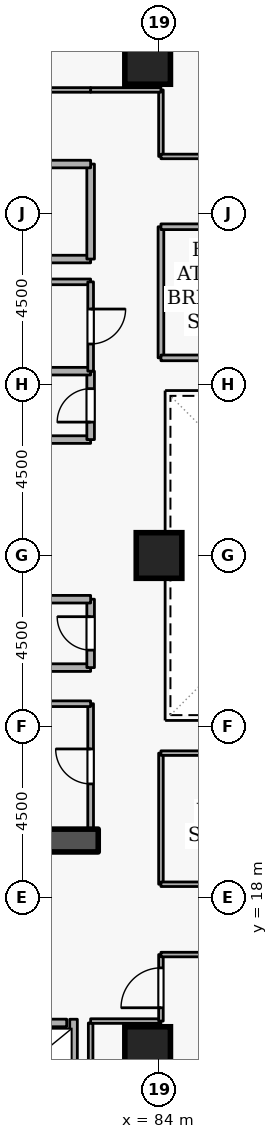
"""IFC4 building model, lengths in metres.
Left out: names, types, materials, properties, quantities, classifications, styles, units other than length and angle.
Written with IfcOpenShell. Run it as: python <this file> out.ifc"""

import sys

from ifc_helpers import new_model, si_unit, direction, frame, frame_2d, origin, origin_2d, place, context, subcontext, project, spatial, rectangle, extrude, element, fill, save


model = new_model("IFC4")
c1 = context("Model", 3, precision=1e-05, world=origin(), true_north=direction((0.0, 1.0)))
c2 = subcontext(c1, "Body", "Model", "MODEL_VIEW")
j1 = project(units=[si_unit("LENGTHUNIT", "METRE"), si_unit("PLANEANGLEUNIT", "RADIAN")], contexts=[c1])
p1 = place(None, origin())
s1 = spatial("IfcSite", under=j1, at=p1, CompositionType="ELEMENT")
p2 = place(p1, origin())
s2 = spatial("IfcBuilding", under=s1, at=p2, CompositionType="ELEMENT")
p3 = place(p2, frame((0.0, 0.0, 116.1)))
s3 = spatial("IfcBuildingStorey", under=s2, at=p3, CompositionType="ELEMENT", Elevation=116.1)
p4 = place(p3, frame((76.7, 19.5, 0.0), z_axis=(0.0, 0.0, 1.0), x_axis=(1.0, 0.0, 0.0)))
e1 = element("IfcWall", 1, at=p4, inside=s3, PredefinedType="SHEAR", context=c2, shape_type="SweptSolid", body=[
    extrude(rectangle(XDim=5.7, YDim=0.6, at=frame_2d((2.85, 0.0))), origin(), (0.0, 0.0, 1.0), 3.6),
])
for number, where, z_axis, x_axis in (
    (2, (83.7, 14.0, 0.0), (0.0, 0.0, 1.0), (1.0, 0.0, 0.0)),
    (3, (83.7, 40.0, 0.0), (0.0, 0.0, 1.0), (1.0, 0.0, 0.0)),
    (4, (84.0, 27.0, 0.0), (0.0, 0.0, 1.0), (1.0, 0.0, 0.0)),
):
    element("IfcColumn", number, at=place(p3, frame(where, z_axis=z_axis, x_axis=x_axis)), inside=s3, PredefinedType="COLUMN", context=c2, shape_type="SweptSolid", body=[
        extrude(rectangle(XDim=1.2, YDim=1.2, at=origin_2d()), origin(), (0.0, 0.0, 1.0), 3.6),
    ])
p5 = place(p3, frame((79.63, 14.7, 0.0), z_axis=(0.0, 0.0, 1.0), x_axis=(1.0, 0.0, 0.0)))
e5 = element("IfcWall", 5, at=p5, inside=s3, PredefinedType="STANDARD", context=c2, shape_type="SweptSolid", body=[
    extrude(rectangle(XDim=1.94, YDim=0.2, at=frame_2d((0.97, 0.0))), origin(), (0.0, 0.0, 1.0), 3.32),
])
p6 = place(p5, frame((0.46, 0.0, 0.0)))
e6 = element("IfcOpeningElement", 6, at=p6, cuts=e5, PredefinedType="OPENING", context=c2, shape_type="SweptSolid", body=[
    extrude(rectangle(XDim=1.02, YDim=2.06, at=frame_2d((0.51, 1.03))), frame((0.0, 0.11, 0.0), z_axis=(0.0, -1.0, 0.0), x_axis=(1.0, 0.0, 0.0)), (0.0, 0.0, 1.0), 0.22),
])
p7 = place(p3, frame((81.75, 12.612, 0.0), z_axis=(0.0, 0.0, 1.0), x_axis=(0.0, 1.0, 0.0)))
e7 = element("IfcWall", 7, at=p7, inside=s3, PredefinedType="STANDARD", context=c2, shape_type="SweptSolid", body=[
    extrude(rectangle(XDim=2.186, YDim=0.2, at=frame_2d((1.093, 0.0))), origin(), (0.0, 0.0, 1.0), 3.32),
])
p8 = place(p3, frame((79.9, 34.8, 0.0), z_axis=(0.0, 0.0, 1.0), x_axis=(1.0, 0.0, 0.0)))
e8 = element("IfcWall", 8, at=p8, inside=s3, PredefinedType="STANDARD", context=c2, shape_type="SweptSolid", body=[
    extrude(rectangle(XDim=2.3, YDim=0.2, at=frame_2d((1.15, 0.0))), origin(), (0.0, 0.0, 1.0), 2.525),
])
p9 = place(p3, frame((82.2, 34.8, 0.0), z_axis=(0.0, 0.0, 1.0), x_axis=(0.0, 1.0, 0.0)))
e9 = element("IfcWall", 9, at=p9, inside=s3, PredefinedType="STANDARD", context=c2, shape_type="SweptSolid", body=[
    extrude(rectangle(XDim=2.5, YDim=0.2, at=frame_2d((1.25, 0.0))), origin(), (0.0, 0.0, 1.0), 3.32),
])
p10 = place(p3, frame((82.2, 37.3, 0.0), z_axis=(0.0, 0.0, 1.0), x_axis=(-1.0, 0.0, 0.0)))
e10 = element("IfcWall", 10, at=p10, inside=s3, PredefinedType="STANDARD", context=c2, shape_type="SweptSolid", body=[
    extrude(rectangle(XDim=5.7, YDim=0.2, at=frame_2d((2.85, 0.0))), origin(), (0.0, 0.0, 1.0), 3.32),
])
p11 = place(p10, frame((2.275, 0.0, 0.0)))
e11 = element("IfcOpeningElement", 11, at=p11, cuts=e10, PredefinedType="OPENING", context=c2, shape_type="SweptSolid", body=[
    extrude(rectangle(XDim=1.15, YDim=2.1, at=frame_2d((0.575, 1.05))), frame((0.0, 0.11, 0.0), z_axis=(0.0, -1.0, 0.0), x_axis=(1.0, 0.0, 0.0)), (0.0, 0.0, 1.0), 0.22),
])
p12 = place(p3, frame((80.15, 24.05, 0.0), z_axis=(0.0, 0.0, 1.0), x_axis=(1.0, 0.0, 0.0)))
e12 = element("IfcWall", 12, at=p12, inside=s3, PredefinedType="STANDARD", context=c2, shape_type="SweptSolid", body=[
    extrude(rectangle(XDim=2.05, YDim=0.2, at=frame_2d((1.025, 0.0))), origin(), (0.0, 0.0, 1.0), 3.32),
])
p13 = place(p3, frame((82.2, 24.05, 0.0), z_axis=(0.0, 0.0, 1.0), x_axis=(0.0, 1.0, 0.0)))
e13 = element("IfcWall", 13, at=p13, inside=s3, PredefinedType="STANDARD", context=c2, shape_type="SweptSolid", body=[
    extrude(rectangle(XDim=1.8, YDim=0.2, at=frame_2d((0.9, 0.0))), origin(), (0.0, 0.0, 1.0), 3.32),
])
p14 = place(p13, frame((0.46, 0.0, 0.0)))
e14 = element("IfcOpeningElement", 14, at=p14, cuts=e13, PredefinedType="OPENING", context=c2, shape_type="SweptSolid", body=[
    extrude(rectangle(XDim=0.88, YDim=2.04, at=frame_2d((0.44, 1.02))), frame((0.0, 0.11, 0.0), z_axis=(0.0, -1.0, 0.0), x_axis=(1.0, 0.0, 0.0)), (0.0, 0.0, 1.0), 0.22),
])
for number, where, z_axis, x_axis in (
    (15, (82.2, 25.85, 0.0), (0.0, 0.0, 1.0), (-1.0, 0.0, 0.0)),
    (16, (80.15, 30.05, 0.0), (0.0, 0.0, 1.0), (1.0, 0.0, 0.0)),
):
    element("IfcWall", number, at=place(p3, frame(where, z_axis=z_axis, x_axis=x_axis)), inside=s3, PredefinedType="STANDARD", context=c2, shape_type="SweptSolid", body=[
        extrude(rectangle(XDim=2.05, YDim=0.2, at=frame_2d((1.025, 0.0))), origin(), (0.0, 0.0, 1.0), 3.32),
    ])
p15 = place(p3, frame((82.2, 30.05, 0.0), z_axis=(0.0, 0.0, 1.0), x_axis=(0.0, 1.0, 0.0)))
e17 = element("IfcWall", 17, at=p15, inside=s3, PredefinedType="STANDARD", context=c2, shape_type="SweptSolid", body=[
    extrude(rectangle(XDim=1.8, YDim=0.2, at=frame_2d((0.9, 0.0))), origin(), (0.0, 0.0, 1.0), 3.32),
])
p16 = place(p15, frame((0.46, 0.0, 0.0)))
e18 = element("IfcOpeningElement", 18, at=p16, cuts=e17, PredefinedType="OPENING", context=c2, shape_type="SweptSolid", body=[
    extrude(rectangle(XDim=0.88, YDim=2.04, at=frame_2d((0.44, 1.02))), frame((0.0, 0.11, 0.0), z_axis=(0.0, -1.0, 0.0), x_axis=(1.0, 0.0, 0.0)), (0.0, 0.0, 1.0), 0.22),
])
p17 = place(p3, frame((82.2, 31.85, 0.0), z_axis=(0.0, 0.0, 1.0), x_axis=(-1.0, 0.0, 0.0)))
e19 = element("IfcWall", 19, at=p17, inside=s3, PredefinedType="STANDARD", context=c2, shape_type="SweptSolid", body=[
    extrude(rectangle(XDim=2.05, YDim=0.2, at=frame_2d((1.025, 0.0))), origin(), (0.0, 0.0, 1.0), 3.32),
])
p18 = place(p3, frame((82.2, 19.8, 0.0), z_axis=(0.0, 0.0, 1.0), x_axis=(0.0, 1.0, 0.0)))
e20 = element("IfcWall", 20, at=p18, inside=s3, PredefinedType="PARTITIONING", context=c2, shape_type="SweptSolid", body=[
    extrude(rectangle(XDim=3.3, YDim=0.15, at=frame_2d((1.65, 0.0))), origin(), (0.0, 0.0, 1.0), 3.32),
])
p19 = place(p18, frame((1.19, 0.0, 0.0)))
e21 = element("IfcOpeningElement", 21, at=p19, cuts=e20, PredefinedType="OPENING", context=c2, shape_type="SweptSolid", body=[
    extrude(rectangle(XDim=0.92, YDim=2.08, at=frame_2d((0.46, 1.04))), frame((0.0, 0.085, 0.0), z_axis=(0.0, -1.0, 0.0), x_axis=(1.0, 0.0, 0.0)), (0.0, 0.0, 1.0), 0.17),
])
p20 = place(p3, frame((82.2, 23.1, 0.0), z_axis=(0.0, 0.0, 1.0), x_axis=(-1.0, 0.0, 0.0)))
e22 = element("IfcWall", 22, at=p20, inside=s3, PredefinedType="PARTITIONING", context=c2, shape_type="SweptSolid", body=[
    extrude(rectangle(XDim=2.05, YDim=0.15, at=frame_2d((1.025, 0.0))), origin(), (0.0, 0.0, 1.0), 3.32),
])
p21 = place(p3, frame((80.15, 34.2, 0.0), z_axis=(0.0, 0.0, 1.0), x_axis=(1.0, 0.0, 0.0)))
e23 = element("IfcWall", 23, at=p21, inside=s3, PredefinedType="PARTITIONING", context=c2, shape_type="SweptSolid", body=[
    extrude(rectangle(XDim=2.05, YDim=0.15, at=frame_2d((1.025, 0.0))), origin(), (0.0, 0.0, 1.0), 2.525),
])
p22 = place(p3, frame((82.2, 34.2, 0.0), z_axis=(0.0, 0.0, 1.0), x_axis=(0.0, -1.0, 0.0)))
e24 = element("IfcWall", 24, at=p22, inside=s3, PredefinedType="PARTITIONING", context=c2, shape_type="SweptSolid", body=[
    extrude(rectangle(XDim=2.35, YDim=0.15, at=frame_2d((1.175, 0.0))), origin(), (0.0, 0.0, 1.0), 3.32),
])
p23 = place(p22, frame((0.715, 0.0, 0.0)))
e25 = element("IfcOpeningElement", 25, at=p23, cuts=e24, PredefinedType="OPENING", context=c2, shape_type="SweptSolid", body=[
    extrude(rectangle(XDim=0.92, YDim=2.08, at=frame_2d((0.46, 1.04))), frame((0.0, 0.085, 0.0), z_axis=(0.0, -1.0, 0.0), x_axis=(1.0, 0.0, 0.0)), (0.0, 0.0, 1.0), 0.17),
])
p24 = place(p3, frame((82.2, 12.4, 0.0), z_axis=(0.0, 0.0, 1.0), x_axis=(0.0, 1.0, 0.0)))
e26 = element("IfcWall", 26, at=p24, inside=s3, PredefinedType="PARTITIONING", context=c2, shape_type="SweptSolid", body=[
    extrude(rectangle(XDim=2.3, YDim=0.12, at=frame_2d((1.15, 0.0))), origin(), (0.0, 0.0, 1.0), 3.32),
])
p25 = place(p3, frame((82.2, 14.75, 0.0), z_axis=(0.0, 0.0, 1.0), x_axis=(1.0, 0.0, 0.0)))
e27 = element("IfcWall", 27, at=p25, inside=s3, PredefinedType="PARTITIONING", context=c2, shape_type="SweptSolid", body=[
    extrude(rectangle(XDim=1.85, YDim=0.12, at=frame_2d((0.925, 0.0))), origin(), (0.0, 0.0, 1.0), 3.32),
])
p26 = place(p3, frame((84.05, 14.75, 0.0), z_axis=(0.0, 0.0, 1.0), x_axis=(0.0, 1.0, 0.0)))
e28 = element("IfcWall", 28, at=p26, inside=s3, PredefinedType="PARTITIONING", context=c2, shape_type="SweptSolid", body=[
    extrude(rectangle(XDim=1.75, YDim=0.12, at=frame_2d((0.875, 0.0))), origin(), (0.0, 0.0, 1.0), 3.32),
])
p27 = place(p26, frame((0.35, 0.0, 0.0)))
e29 = element("IfcOpeningElement", 29, at=p27, cuts=e28, PredefinedType="OPENING", context=c2, shape_type="SweptSolid", body=[
    extrude(rectangle(XDim=1.05, YDim=2.1, at=frame_2d((0.525, 1.05))), frame((0.0, 0.07, 0.0), z_axis=(0.0, -1.0, 0.0), x_axis=(1.0, 0.0, 0.0)), (0.0, 0.0, 1.0), 0.14),
])
p28 = place(p3, frame((84.05, 16.5, 0.0), z_axis=(0.0, 0.0, 1.0), x_axis=(1.0, 0.0, 0.0)))
e30 = element("IfcWall", 30, at=p28, inside=s3, PredefinedType="PARTITIONING", context=c2, shape_type="SweptSolid", body=[
    extrude(rectangle(XDim=1.3, YDim=0.12, at=frame_2d((0.65, 0.0))), origin(), (0.0, 0.0, 1.0), 3.32),
])
p29 = place(p3, frame((84.05, 37.5, 0.0), z_axis=(0.0, 0.0, 1.0), x_axis=(0.0, 1.0, 0.0)))
e31 = element("IfcWall", 31, at=p29, inside=s3, PredefinedType="PARTITIONING", context=c2, shape_type="SweptSolid", body=[
    extrude(rectangle(XDim=1.75, YDim=0.12, at=frame_2d((0.875, 0.0))), origin(), (0.0, 0.0, 1.0), 3.32),
])
p30 = place(p3, frame((84.05, 39.25, 0.0), z_axis=(0.0, 0.0, 1.0), x_axis=(-1.0, 0.0, 0.0)))
e32 = element("IfcWall", 32, at=p30, inside=s3, PredefinedType="PARTITIONING", context=c2, shape_type="SweptSolid", body=[
    extrude(rectangle(XDim=1.85, YDim=0.12, at=frame_2d((0.925, 0.0))), origin(), (0.0, 0.0, 1.0), 3.32),
])
p31 = place(p3, frame((82.2, 39.25, 0.0), z_axis=(0.0, 0.0, 1.0), x_axis=(-1.0, 0.0, 0.0)))
e33 = element("IfcWall", 33, at=p31, inside=s3, PredefinedType="PARTITIONING", context=c2, shape_type="SweptSolid", body=[
    extrude(rectangle(XDim=9.35, YDim=0.12, at=frame_2d((4.675, 0.0))), origin(), (0.0, 0.0, 1.0), 3.32),
])
p32 = place(p31, frame((4.2, 0.0, 0.0)))
e34 = element("IfcOpeningElement", 34, at=p32, cuts=e33, PredefinedType="OPENING", context=c2, shape_type="SweptSolid", body=[
    extrude(rectangle(XDim=0.95, YDim=2.1, at=frame_2d((0.475, 1.05))), frame((0.0, 0.07, 0.0), z_axis=(0.0, -1.0, 0.0), x_axis=(1.0, 0.0, 0.0)), (0.0, 0.0, 1.0), 0.14),
])
p33 = place(p3, frame((85.35, 37.5, 0.0), z_axis=(0.0, 0.0, 1.0), x_axis=(-1.0, 0.0, 0.0)))
e35 = element("IfcWall", 35, at=p33, inside=s3, PredefinedType="PARTITIONING", context=c2, shape_type="SweptSolid", body=[
    extrude(rectangle(XDim=1.3, YDim=0.12, at=frame_2d((0.65, 0.0))), origin(), (0.0, 0.0, 1.0), 3.32),
])
p34 = place(p3, frame((84.05, 32.2, 0.0), z_axis=(0.0, 0.0, 1.0), x_axis=(0.0, 1.0, 0.0)))
e36 = element("IfcWall", 36, at=p34, inside=s3, PredefinedType="PARTITIONING", context=c2, shape_type="SweptSolid", body=[
    extrude(rectangle(XDim=3.45, YDim=0.15, at=frame_2d((1.725, 0.0))), origin(), (0.0, 0.0, 1.0), 3.32),
])
p35 = place(p3, frame((84.05, 35.65, 0.0), z_axis=(0.0, 0.0, 1.0), x_axis=(1.0, 0.0, 0.0)))
e37 = element("IfcWall", 37, at=p35, inside=s3, PredefinedType="PARTITIONING", context=c2, shape_type="SweptSolid", body=[
    extrude(rectangle(XDim=8.9, YDim=0.15, at=frame_2d((4.45, 0.0))), origin(), (0.0, 0.0, 1.0), 3.32),
])
p36 = place(p35, frame((3.8, 0.0, 0.0)))
e38 = element("IfcOpeningElement", 38, at=p36, cuts=e37, PredefinedType="OPENING", context=c2, shape_type="SweptSolid", body=[
    extrude(rectangle(XDim=1.3, YDim=2.12, at=frame_2d((0.65, 1.06))), frame((0.0, 0.085, 0.0), z_axis=(0.0, -1.0, 0.0), x_axis=(1.0, 0.0, 0.0)), (0.0, 0.0, 1.0), 0.17),
])
p37 = place(p3, frame((92.95, 32.2, 0.0), z_axis=(0.0, 0.0, 1.0), x_axis=(-1.0, 0.0, 0.0)))
e39 = element("IfcWall", 39, at=p37, inside=s3, PredefinedType="PARTITIONING", context=c2, shape_type="SweptSolid", body=[
    extrude(rectangle(XDim=8.9, YDim=0.15, at=frame_2d((4.45, 0.0))), origin(), (0.0, 0.0, 1.0), 3.32),
])
p38 = place(p3, frame((84.05, 18.35, 0.0), z_axis=(0.0, 0.0, 1.0), x_axis=(0.0, 1.0, 0.0)))
e40 = element("IfcWall", 40, at=p38, inside=s3, PredefinedType="PARTITIONING", context=c2, shape_type="SweptSolid", body=[
    extrude(rectangle(XDim=3.45, YDim=0.12, at=frame_2d((1.725, 0.0))), origin(), (0.0, 0.0, 1.0), 3.32),
])
p39 = place(p3, frame((84.05, 21.8, 0.0), z_axis=(0.0, 0.0, 1.0), x_axis=(1.0, 0.0, 0.0)))
e41 = element("IfcWall", 41, at=p39, inside=s3, PredefinedType="PARTITIONING", context=c2, shape_type="SweptSolid", body=[
    extrude(rectangle(XDim=8.9, YDim=0.12, at=frame_2d((4.45, 0.0))), origin(), (0.0, 0.0, 1.0), 3.32),
])
p40 = place(p3, frame((92.95, 18.35, 0.0), z_axis=(0.0, 0.0, 1.0), x_axis=(-1.0, 0.0, 0.0)))
e42 = element("IfcWall", 42, at=p40, inside=s3, PredefinedType="PARTITIONING", context=c2, shape_type="SweptSolid", body=[
    extrude(rectangle(XDim=8.9, YDim=0.12, at=frame_2d((4.45, 0.0))), origin(), (0.0, 0.0, 1.0), 3.32),
])
p41 = place(p40, frame((2.875, 0.0, 0.0)))
e43 = element("IfcOpeningElement", 43, at=p41, cuts=e42, PredefinedType="OPENING", context=c2, shape_type="SweptSolid", body=[
    extrude(rectangle(XDim=0.95, YDim=2.1, at=frame_2d((0.475, 1.05))), frame((0.0, 0.07, 0.0), z_axis=(0.0, -1.0, 0.0), x_axis=(1.0, 0.0, 0.0)), (0.0, 0.0, 1.0), 0.14),
])
p42 = place(p14, origin())
e44 = element("IfcDoor", 44, at=p42, inside=s3, OperationType="SINGLE_SWING_RIGHT", PredefinedType="DOOR", context=c2, shape_type="SweptSolid", body=[
    extrude(rectangle(XDim=0.88, YDim=2.04, at=frame_2d((0.44, 1.02))), frame((0.0, 0.025, 0.0), z_axis=(0.0, -1.0, 0.0), x_axis=(1.0, 0.0, 0.0)), (0.0, 0.0, 1.0), 0.05),
])
fill(e14, e44)
p43 = place(p16, origin())
e45 = element("IfcDoor", 45, at=p43, inside=s3, OperationType="SINGLE_SWING_LEFT", PredefinedType="DOOR", context=c2, shape_type="SweptSolid", body=[
    extrude(rectangle(XDim=0.88, YDim=2.04, at=frame_2d((0.44, 1.02))), frame((0.0, 0.025, 0.0), z_axis=(0.0, -1.0, 0.0), x_axis=(1.0, 0.0, 0.0)), (0.0, 0.0, 1.0), 0.05),
])
fill(e18, e45)
p44 = place(p19, origin())
e46 = element("IfcDoor", 46, at=p44, inside=s3, OperationType="SINGLE_SWING_RIGHT", PredefinedType="DOOR", context=c2, shape_type="SweptSolid", body=[
    extrude(rectangle(XDim=0.92, YDim=2.08, at=frame_2d((0.46, 1.04))), frame((0.0, 0.025, 0.0), z_axis=(0.0, -1.0, 0.0), x_axis=(1.0, 0.0, 0.0)), (0.0, 0.0, 1.0), 0.05),
])
fill(e21, e46)
p45 = place(p23, origin())
e47 = element("IfcDoor", 47, at=p45, inside=s3, OperationType="SINGLE_SWING_LEFT", PredefinedType="DOOR", context=c2, shape_type="SweptSolid", body=[
    extrude(rectangle(XDim=0.92, YDim=2.08, at=frame_2d((0.46, 1.04))), frame((0.0, 0.025, 0.0), z_axis=(0.0, -1.0, 0.0), x_axis=(1.0, 0.0, 0.0)), (0.0, 0.0, 1.0), 0.05),
])
fill(e25, e47)
p46 = place(p27, origin())
e48 = element("IfcDoor", 48, at=p46, inside=s3, OperationType="SINGLE_SWING_LEFT", PredefinedType="DOOR", context=c2, shape_type="SweptSolid", body=[
    extrude(rectangle(XDim=1.05, YDim=2.1, at=frame_2d((0.525, 1.05))), frame((0.0, 0.025, 0.0), z_axis=(0.0, -1.0, 0.0), x_axis=(1.0, 0.0, 0.0)), (0.0, 0.0, 1.0), 0.05),
])
fill(e29, e48)
save(model, sys.argv[1])
